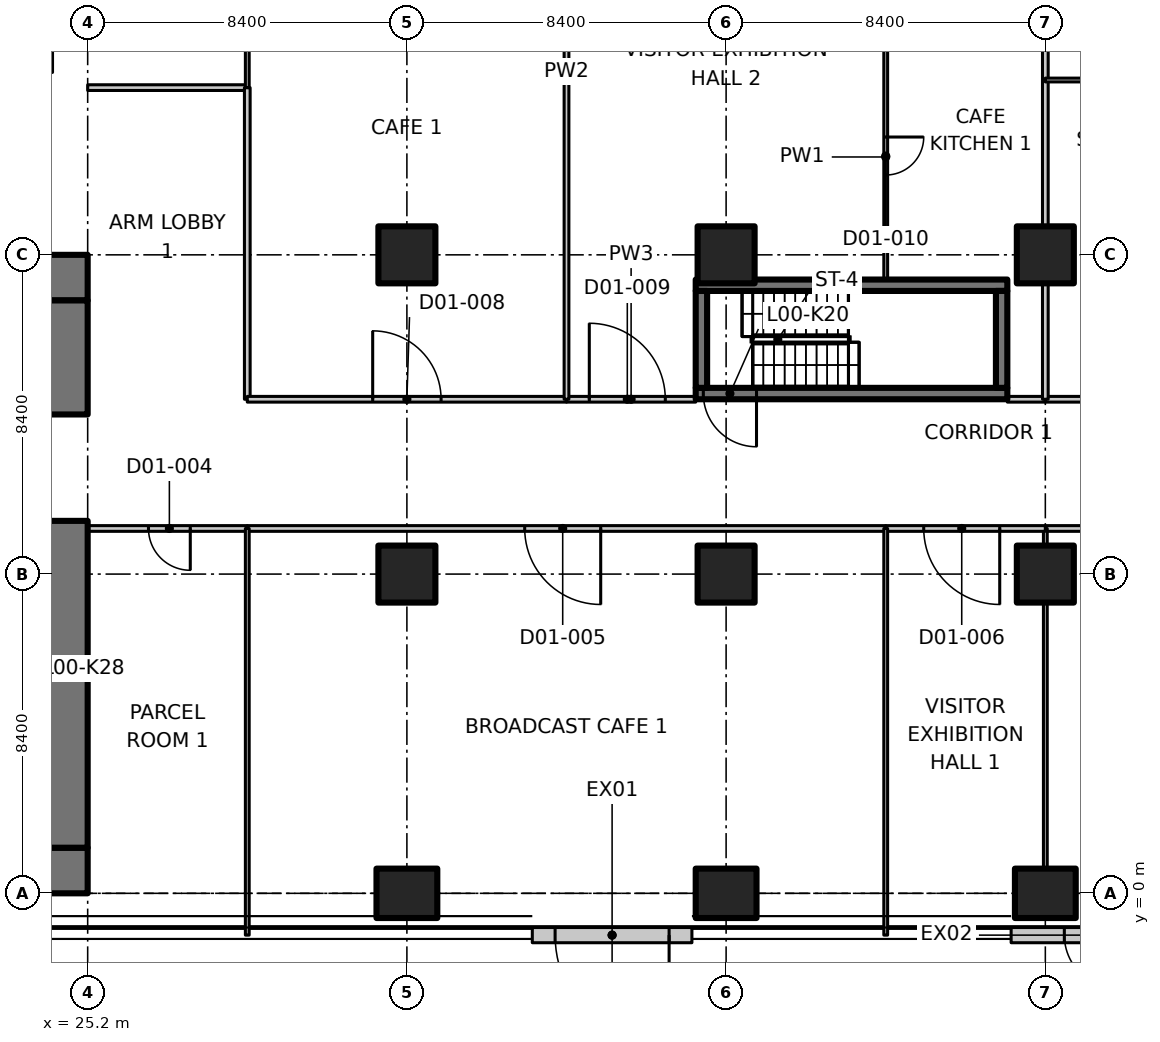
"""IFC4 building model, lengths in metres.
Left out: names, types, materials, properties, quantities, classifications, styles, units other than length and angle.
Written with IfcOpenShell. Run it as: python <this file> out.ifc"""

import sys

from ifc_helpers import new_model, si_unit, direction, frame, frame_2d, origin, origin_2d, place, context, subcontext, project, spatial, polyline, rectangle, outline, extrude, element, fill, save


model = new_model("IFC4")
c1 = context("Model", 3, precision=1e-05, world=origin(), true_north=direction((0.0, 1.0)))
c2 = subcontext(c1, "Body", "Model", "MODEL_VIEW")
j1 = project(units=[si_unit("LENGTHUNIT", "METRE"), si_unit("PLANEANGLEUNIT", "RADIAN")], contexts=[c1])
p1 = place(None, origin())
s1 = spatial("IfcSite", under=j1, at=p1, CompositionType="ELEMENT")
p2 = place(p1, origin())
s2 = spatial("IfcBuilding", under=s1, at=p2, CompositionType="ELEMENT")
p3 = place(p2, origin())
s3 = spatial("IfcBuildingStorey", under=s2, at=p3, CompositionType="ELEMENT", Elevation=0.0)
p4 = place(p3, frame((33.6, 0.0, 0.0), z_axis=(0.0, 0.0, 1.0), x_axis=(0.0, 1.0, 0.0)))
e1 = element("IfcColumn", 1, at=p4, inside=s3, PredefinedType="COLUMN", context=c2, shape_type="SweptSolid", body=[
    extrude(rectangle(XDim=1.3, YDim=1.6, at=origin_2d()), origin(), (0.0, 0.0, 1.0), 6.75),
])
for number, where, z_axis, x_axis in (
    (2, (33.6, 8.4, 0.0), (0.0, 0.0, 1.0), (1.0, 0.0, 0.0)),
    (3, (33.6, 16.8, 0.0), (0.0, 0.0, 1.0), (1.0, 0.0, 0.0)),
):
    element("IfcColumn", number, at=place(p3, frame(where, z_axis=z_axis, x_axis=x_axis)), inside=s3, PredefinedType="COLUMN", context=c2, shape_type="SweptSolid", body=[
        extrude(rectangle(XDim=1.5, YDim=1.5, at=origin_2d()), origin(), (0.0, 0.0, 1.0), 6.75),
    ])
p5 = place(p3, frame((42.0, 0.0, 0.0), z_axis=(0.0, 0.0, 1.0), x_axis=(0.0, 1.0, 0.0)))
e4 = element("IfcColumn", 4, at=p5, inside=s3, PredefinedType="COLUMN", context=c2, shape_type="SweptSolid", body=[
    extrude(rectangle(XDim=1.3, YDim=1.6, at=origin_2d()), origin(), (0.0, 0.0, 1.0), 6.75),
])
for number, where, z_axis, x_axis in (
    (5, (42.0, 8.4, 0.0), (0.0, 0.0, 1.0), (1.0, 0.0, 0.0)),
    (6, (42.0, 16.8, 0.0), (0.0, 0.0, 1.0), (1.0, 0.0, 0.0)),
):
    element("IfcColumn", number, at=place(p3, frame(where, z_axis=z_axis, x_axis=x_axis)), inside=s3, PredefinedType="COLUMN", context=c2, shape_type="SweptSolid", body=[
        extrude(rectangle(XDim=1.5, YDim=1.5, at=origin_2d()), origin(), (0.0, 0.0, 1.0), 6.75),
    ])
p6 = place(p3, frame((50.4, 0.0, 0.0), z_axis=(0.0, 0.0, 1.0), x_axis=(0.0, 1.0, 0.0)))
e7 = element("IfcColumn", 7, at=p6, inside=s3, PredefinedType="COLUMN", context=c2, shape_type="SweptSolid", body=[
    extrude(rectangle(XDim=1.3, YDim=1.6, at=origin_2d()), origin(), (0.0, 0.0, 1.0), 6.75),
])
for number, where, z_axis, x_axis in (
    (8, (50.4, 8.4, 0.0), (0.0, 0.0, 1.0), (1.0, 0.0, 0.0)),
    (9, (50.4, 16.8, 0.0), (0.0, 0.0, 1.0), (1.0, 0.0, 0.0)),
):
    element("IfcColumn", number, at=place(p3, frame(where, z_axis=z_axis, x_axis=x_axis)), inside=s3, PredefinedType="COLUMN", context=c2, shape_type="SweptSolid", body=[
        extrude(rectangle(XDim=1.5, YDim=1.5, at=origin_2d()), origin(), (0.0, 0.0, 1.0), 6.75),
    ])
p7 = place(p3, frame((41.1, -1.1, 0.0), z_axis=(0.0, 0.0, 1.0), x_axis=(-1.0, 0.0, 0.0)))
e10 = element("IfcWall", 10, at=p7, inside=s3, PredefinedType="SOLIDWALL", context=c2, shape_type="SweptSolid", body=[
    extrude(rectangle(XDim=4.2, YDim=0.4, at=frame_2d((2.1, 0.0))), origin(), (0.0, 0.0, 1.0), 6.75),
])
p8 = place(p7, frame((0.6, 0.0, 0.0)))
e11 = element("IfcOpeningElement", 11, at=p8, cuts=e10, PredefinedType="OPENING", context=c2, shape_type="SweptSolid", body=[
    extrude(rectangle(XDim=3.0, YDim=2.8, at=frame_2d((1.5, 1.4))), frame((0.0, 0.21, 0.0), z_axis=(0.0, -1.0, 0.0), x_axis=(1.0, 0.0, 0.0)), (0.0, 0.0, 1.0), 0.42),
])
p9 = place(p3, frame((53.7, -1.1, 0.0), z_axis=(0.0, 0.0, 1.0), x_axis=(-1.0, 0.0, 0.0)))
e12 = element("IfcWall", 12, at=p9, inside=s3, PredefinedType="SOLIDWALL", context=c2, shape_type="SweptSolid", body=[
    extrude(rectangle(XDim=4.2, YDim=0.4, at=frame_2d((2.1, 0.0))), origin(), (0.0, 0.0, 1.0), 6.75),
])
p10 = place(p9, frame((1.4, 0.0, 0.0)))
e13 = element("IfcOpeningElement", 13, at=p10, cuts=e12, PredefinedType="OPENING", context=c2, shape_type="SweptSolid", body=[
    extrude(rectangle(XDim=1.4, YDim=2.4, at=frame_2d((0.7, 1.2))), frame((0.0, 0.21, 0.0), z_axis=(0.0, -1.0, 0.0), x_axis=(1.0, 0.0, 0.0)), (0.0, 0.0, 1.0), 0.42),
])
p11 = place(p3, frame((25.2, 0.6, 0.0), z_axis=(0.0, 0.0, 1.0), x_axis=(-1.0, 0.0, 0.0)))
e14 = element("IfcWall", 14, at=p11, inside=s3, PredefinedType="SHEAR", context=c2, shape_type="SweptSolid", body=[
    extrude(rectangle(XDim=18.464, YDim=1.2, at=frame_2d((9.232, 0.0))), origin(), (0.0, 0.0, 1.0), 6.75),
])
p12 = place(p11, frame((7.8, 0.0, 0.0)))
e15 = element("IfcOpeningElement", 15, at=p12, cuts=e14, PredefinedType="OPENING", context=c2, shape_type="SweptSolid", body=[
    extrude(rectangle(XDim=1.4, YDim=2.1, at=frame_2d((0.7, 1.05))), frame((0.0, 0.61, 0.0), z_axis=(0.0, -1.0, 0.0), x_axis=(1.0, 0.0, 0.0)), (0.0, 0.0, 1.0), 1.22),
])
p13 = place(p3, frame((23.8, 16.2, 0.0), z_axis=(0.0, 0.0, 1.0), x_axis=(1.0, 0.0, 0.0)))
e16 = element("IfcWall", 16, at=p13, inside=s3, PredefinedType="SHEAR", context=c2, shape_type="SweptSolid", body=[
    extrude(rectangle(XDim=1.4, YDim=1.2, at=frame_2d((0.7, 0.0))), origin(), (0.0, 0.0, 1.0), 6.75),
])
p14 = place(p3, frame((24.6, 1.2, 0.0), z_axis=(0.0, 0.0, 1.0), x_axis=(0.0, 1.0, 0.0)))
e17 = element("IfcWall", 17, at=p14, inside=s3, PredefinedType="SHEAR", context=c2, shape_type="SweptSolid", body=[
    extrude(rectangle(XDim=8.6, YDim=1.2, at=frame_2d((4.3, 0.0))), origin(), (0.0, 0.0, 1.0), 6.75),
])
p15 = place(p3, frame((24.6, 12.6, 0.0), z_axis=(0.0, 0.0, 1.0), x_axis=(0.0, 1.0, 0.0)))
e18 = element("IfcWall", 18, at=p15, inside=s3, PredefinedType="SHEAR", context=c2, shape_type="SweptSolid", body=[
    extrude(rectangle(XDim=3.0, YDim=1.2, at=frame_2d((1.5, 0.0))), origin(), (0.0, 0.0, 1.0), 6.75),
])
p16 = place(p3, frame((49.4, 13.15, 0.0), z_axis=(0.0, 0.0, 1.0), x_axis=(-1.0, 0.0, 0.0)))
e19 = element("IfcWall", 19, at=p16, inside=s3, PredefinedType="SHEAR", context=c2, shape_type="SweptSolid", body=[
    extrude(rectangle(XDim=8.2, YDim=0.3, at=frame_2d((4.1, 0.0))), origin(), (0.0, 0.0, 1.0), 6.75),
])
p17 = place(p16, frame((6.6, 0.0, 0.0)))
e20 = element("IfcOpeningElement", 20, at=p17, cuts=e19, PredefinedType="OPENING", context=c2, shape_type="SweptSolid", body=[
    extrude(rectangle(XDim=1.4, YDim=2.1, at=frame_2d((0.7, 1.05))), frame((0.0, 0.16, 0.0), z_axis=(0.0, -1.0, 0.0), x_axis=(1.0, 0.0, 0.0)), (0.0, 0.0, 1.0), 0.32),
])
p18 = place(p3, frame((41.2, 16.0, 0.0), z_axis=(0.0, 0.0, 1.0), x_axis=(1.0, 0.0, 0.0)))
e21 = element("IfcWall", 21, at=p18, inside=s3, PredefinedType="SHEAR", context=c2, shape_type="SweptSolid", body=[
    extrude(rectangle(XDim=8.2, YDim=0.3, at=frame_2d((4.1, 0.0))), origin(), (0.0, 0.0, 1.0), 6.75),
])
for number, where, z_axis, x_axis in (
    (22, (41.35, 13.3, 0.0), (0.0, 0.0, 1.0), (0.0, 1.0, 0.0)),
    (23, (49.25, 13.3, 0.0), (0.0, 0.0, 1.0), (0.0, 1.0, 0.0)),
):
    element("IfcWall", number, at=place(p3, frame(where, z_axis=z_axis, x_axis=x_axis)), inside=s3, PredefinedType="SHEAR", context=c2, shape_type="SweptSolid", body=[
        extrude(rectangle(XDim=2.55, YDim=0.3, at=frame_2d((1.275, 0.0))), origin(), (0.0, 0.0, 1.0), 6.75),
    ])
p19 = place(p3, frame((25.2, 21.2, 0.0), z_axis=(0.0, 0.0, 1.0), x_axis=(1.0, 0.0, 0.0)))
e24 = element("IfcWall", 24, at=p19, inside=s3, PredefinedType="PARTITIONING", context=c2, shape_type="SweptSolid", body=[
    extrude(rectangle(XDim=4.2, YDim=0.15, at=frame_2d((2.1, 0.0))), origin(), (0.0, 0.0, 1.0), 6.73),
])
p20 = place(p3, frame((29.4, 9.6, 0.0), z_axis=(0.0, 0.0, 1.0), x_axis=(-1.0, 0.0, 0.0)))
e25 = element("IfcWall", 25, at=p20, inside=s3, PredefinedType="PARTITIONING", context=c2, shape_type="SweptSolid", body=[
    extrude(rectangle(XDim=4.2, YDim=0.15, at=frame_2d((2.1, 0.0))), origin(), (0.0, 0.0, 1.0), 6.73),
])
p21 = place(p20, frame((1.5, 0.0, 0.0)))
e26 = element("IfcOpeningElement", 26, at=p21, cuts=e25, PredefinedType="OPENING", context=c2, shape_type="SweptSolid", body=[
    extrude(rectangle(XDim=1.1, YDim=2.1, at=frame_2d((0.55, 1.05))), frame((0.0, 0.085, 0.0), z_axis=(0.0, -1.0, 0.0), x_axis=(1.0, 0.0, 0.0)), (0.0, 0.0, 1.0), 0.17),
])
p22 = place(p3, frame((29.4, 21.2, 0.0), z_axis=(0.0, 0.0, 1.0), x_axis=(0.0, -1.0, 0.0)))
e27 = element("IfcWall", 27, at=p22, inside=s3, PredefinedType="PARTITIONING", context=c2, shape_type="SweptSolid", body=[
    extrude(rectangle(XDim=8.2, YDim=0.15, at=frame_2d((4.1, 0.0))), origin(), (0.0, 0.0, 1.0), 6.73),
])
p23 = place(p3, frame((29.4, 27.275, 0.0), z_axis=(0.0, 0.0, 1.0), x_axis=(0.0, -1.0, 0.0)))
e28 = element("IfcWall", 28, at=p23, inside=s3, PredefinedType="PARTITIONING", context=c2, shape_type="SweptSolid", body=[
    extrude(outline(polyline([(0.0, 0.0), (6.075, 0.0), (6.075, 6.73), (2.525, 6.73), (2.523, 6.38), (1.627, 6.38), (1.625, 6.73), (0.0, 6.73), (0.0, 0.0)])), frame((0.0, 0.05, 0.0), z_axis=(0.0, -1.0, 0.0), x_axis=(1.0, 0.0, 0.0)), (0.0, 0.0, 1.0), 0.1),
])
p24 = place(p3, frame((63.0, 9.6, 0.0), z_axis=(0.0, 0.0, 1.0), x_axis=(-1.0, 0.0, 0.0)))
e29 = element("IfcWall", 29, at=p24, inside=s3, PredefinedType="PARTITIONING", context=c2, shape_type="SweptSolid", body=[
    extrude(rectangle(XDim=12.6, YDim=0.15, at=frame_2d((6.3, 0.0))), origin(), (0.0, 0.0, 1.0), 6.73),
])
p25 = place(p24, frame((5.2, 0.0, 0.0)))
e30 = element("IfcOpeningElement", 30, at=p25, cuts=e29, PredefinedType="OPENING", context=c2, shape_type="SweptSolid", body=[
    extrude(rectangle(XDim=2.0, YDim=2.4, at=frame_2d((1.0, 1.2))), frame((0.0, 0.085, 0.0), z_axis=(0.0, -1.0, 0.0), x_axis=(1.0, 0.0, 0.0)), (0.0, 0.0, 1.0), 0.17),
])
p26 = place(p3, frame((50.4, 0.67, 0.0), z_axis=(0.0, 0.0, 1.0), x_axis=(0.0, 1.0, 0.0)))
e31 = element("IfcWall", 31, at=p26, inside=s3, PredefinedType="PARTITIONING", context=c2, shape_type="SweptSolid", body=[
    extrude(rectangle(XDim=6.96, YDim=0.1, at=frame_2d((3.48, 0.0))), origin(), (0.0, 0.0, 1.0), 6.73),
])
p27 = place(p3, frame((50.4, 9.17, 0.0), z_axis=(0.0, 0.0, 1.0), x_axis=(0.0, 1.0, 0.0)))
e32 = element("IfcWall", 32, at=p27, inside=s3, PredefinedType="PARTITIONING", context=c2, shape_type="SweptSolid", body=[
    extrude(rectangle(XDim=0.43, YDim=0.1, at=frame_2d((0.215, 0.0))), origin(), (0.0, 0.0, 1.0), 6.73),
])
p28 = place(p3, frame((46.2, 9.6, 0.0), z_axis=(0.0, 0.0, 1.0), x_axis=(-1.0, 0.0, 0.0)))
e33 = element("IfcWall", 33, at=p28, inside=s3, PredefinedType="PARTITIONING", context=c2, shape_type="SweptSolid", body=[
    extrude(rectangle(XDim=16.8, YDim=0.15, at=frame_2d((8.4, 0.0))), origin(), (0.0, 0.0, 1.0), 6.73),
])
p29 = place(p28, frame((7.5, 0.0, 0.0)))
e34 = element("IfcOpeningElement", 34, at=p29, cuts=e33, PredefinedType="OPENING", context=c2, shape_type="SweptSolid", body=[
    extrude(rectangle(XDim=2.0, YDim=2.4, at=frame_2d((1.0, 1.2))), frame((0.0, 0.085, 0.0), z_axis=(0.0, -1.0, 0.0), x_axis=(1.0, 0.0, 0.0)), (0.0, 0.0, 1.0), 0.17),
])
p30 = place(p3, frame((50.4, 9.6, 0.0), z_axis=(0.0, 0.0, 1.0), x_axis=(-1.0, 0.0, 0.0)))
e35 = element("IfcWall", 35, at=p30, inside=s3, PredefinedType="PARTITIONING", context=c2, shape_type="SweptSolid", body=[
    extrude(rectangle(XDim=4.2, YDim=0.15, at=frame_2d((2.1, 0.0))), origin(), (0.0, 0.0, 1.0), 6.73),
])
p31 = place(p30, frame((1.2, 0.0, 0.0)))
e36 = element("IfcOpeningElement", 36, at=p31, cuts=e35, PredefinedType="OPENING", context=c2, shape_type="SweptSolid", body=[
    extrude(rectangle(XDim=2.0, YDim=2.4, at=frame_2d((1.0, 1.2))), frame((0.0, 0.085, 0.0), z_axis=(0.0, -1.0, 0.0), x_axis=(1.0, 0.0, 0.0)), (0.0, 0.0, 1.0), 0.17),
])
p32 = place(p3, frame((29.4, 13.0, 0.0), z_axis=(0.0, 0.0, 1.0), x_axis=(1.0, 0.0, 0.0)))
e37 = element("IfcWall", 37, at=p32, inside=s3, PredefinedType="PARTITIONING", context=c2, shape_type="SweptSolid", body=[
    extrude(rectangle(XDim=8.4, YDim=0.15, at=frame_2d((4.2, 0.0))), origin(), (0.0, 0.0, 1.0), 6.73),
])
p33 = place(p32, frame((3.3, 0.0, 0.0)))
e38 = element("IfcOpeningElement", 38, at=p33, cuts=e37, PredefinedType="OPENING", context=c2, shape_type="SweptSolid", body=[
    extrude(rectangle(XDim=1.8, YDim=2.1, at=frame_2d((0.9, 1.05))), frame((0.0, 0.085, 0.0), z_axis=(0.0, -1.0, 0.0), x_axis=(1.0, 0.0, 0.0)), (0.0, 0.0, 1.0), 0.17),
])
p34 = place(p3, frame((37.8, 13.0, 0.0), z_axis=(0.0, 0.0, 1.0), x_axis=(1.0, 0.0, 0.0)))
e39 = element("IfcWall", 39, at=p34, inside=s3, PredefinedType="PARTITIONING", context=c2, shape_type="SweptSolid", body=[
    extrude(rectangle(XDim=3.4, YDim=0.15, at=frame_2d((1.7, 0.0))), origin(), (0.0, 0.0, 1.0), 6.73),
])
p35 = place(p34, frame((0.6, 0.0, 0.0)))
e40 = element("IfcOpeningElement", 40, at=p35, cuts=e39, PredefinedType="OPENING", context=c2, shape_type="SweptSolid", body=[
    extrude(rectangle(XDim=2.0, YDim=2.4, at=frame_2d((1.0, 1.2))), frame((0.0, 0.085, 0.0), z_axis=(0.0, -1.0, 0.0), x_axis=(1.0, 0.0, 0.0)), (0.0, 0.0, 1.0), 0.17),
])
p36 = place(p3, frame((49.4, 13.0, 0.0), z_axis=(0.0, 0.0, 1.0), x_axis=(1.0, 0.0, 0.0)))
e41 = element("IfcWall", 41, at=p36, inside=s3, PredefinedType="PARTITIONING", context=c2, shape_type="SweptSolid", body=[
    extrude(rectangle(XDim=1.0, YDim=0.15, at=frame_2d((0.5, 0.0))), origin(), (0.0, 0.0, 1.0), 6.73),
])
p37 = place(p3, frame((50.4, 13.0, 0.0), z_axis=(0.0, 0.0, 1.0), x_axis=(1.0, 0.0, 0.0)))
e42 = element("IfcWall", 42, at=p37, inside=s3, PredefinedType="PARTITIONING", context=c2, shape_type="SweptSolid", body=[
    extrude(rectangle(XDim=4.2, YDim=0.15, at=frame_2d((2.1, 0.0))), origin(), (0.0, 0.0, 1.0), 6.73),
])
for number, where, z_axis, x_axis in (
    (43, (29.4, 9.6, 0.0), (0.0, 0.0, 1.0), (0.0, -1.0, 0.0)),
    (44, (46.2, 9.6, 0.0), (0.0, 0.0, 1.0), (0.0, -1.0, 0.0)),
):
    element("IfcWall", number, at=place(p3, frame(where, z_axis=z_axis, x_axis=x_axis)), inside=s3, PredefinedType="PARTITIONING", context=c2, shape_type="SweptSolid", body=[
        extrude(outline(polyline([(0.0, 0.0), (10.7, 0.0), (10.7, 6.73), (10.05, 6.73), (10.048, 6.38), (9.152, 6.38), (9.15, 6.73), (0.0, 6.73), (0.0, 0.0)])), frame((0.0, 0.05, 0.0), z_axis=(0.0, -1.0, 0.0), x_axis=(1.0, 0.0, 0.0)), (0.0, 0.0, 1.0), 0.1),
    ])
p38 = place(p3, frame((37.8, 30.243, 0.0), z_axis=(0.0, 0.0, 1.0), x_axis=(0.0, -1.0, 0.0)))
e45 = element("IfcWall", 45, at=p38, inside=s3, PredefinedType="PARTITIONING", context=c2, shape_type="SweptSolid", body=[
    extrude(outline(polyline([(0.0, 0.0), (17.243, 0.0), (17.243, 6.73), (5.493, 6.73), (5.491, 6.38), (4.595, 6.38), (4.593, 6.73), (0.0, 6.73), (0.0, 0.0)])), frame((0.0, 0.062, 0.0), z_axis=(0.0, -1.0, 0.0), x_axis=(1.0, 0.0, 0.0)), (0.0, 0.0, 1.0), 0.125),
])
p39 = place(p3, frame((46.2, 22.6, 0.0), z_axis=(0.0, 0.0, 1.0), x_axis=(0.0, -1.0, 0.0)))
e46 = element("IfcWall", 46, at=p39, inside=s3, PredefinedType="PARTITIONING", context=c2, shape_type="SweptSolid", body=[
    extrude(rectangle(XDim=6.45, YDim=0.1, at=frame_2d((3.225, 0.0))), origin(), (0.0, 0.0, 1.0), 6.73),
])
p40 = place(p39, frame((2.7, 0.0, 0.0)))
e47 = element("IfcOpeningElement", 47, at=p40, cuts=e46, PredefinedType="OPENING", context=c2, shape_type="SweptSolid", body=[
    extrude(rectangle(XDim=1.0, YDim=2.1, at=frame_2d((0.5, 1.05))), frame((0.0, 0.06, 0.0), z_axis=(0.0, -1.0, 0.0), x_axis=(1.0, 0.0, 0.0)), (0.0, 0.0, 1.0), 0.12),
])
p41 = place(p3, frame((50.4, 21.4, 0.0), z_axis=(0.0, 0.0, 1.0), x_axis=(0.0, -1.0, 0.0)))
e48 = element("IfcWall", 48, at=p41, inside=s3, PredefinedType="PARTITIONING", context=c2, shape_type="SweptSolid", body=[
    extrude(rectangle(XDim=3.83, YDim=0.15, at=frame_2d((1.915, 0.0))), origin(), (0.0, 0.0, 1.0), 6.73),
])
p42 = place(p3, frame((50.4, 16.03, 0.0), z_axis=(0.0, 0.0, 1.0), x_axis=(0.0, -1.0, 0.0)))
e49 = element("IfcWall", 49, at=p42, inside=s3, PredefinedType="PARTITIONING", context=c2, shape_type="SweptSolid", body=[
    extrude(rectangle(XDim=3.03, YDim=0.15, at=frame_2d((1.515, 0.0))), origin(), (0.0, 0.0, 1.0), 6.73),
])
p43 = place(p3, frame((50.4, 22.6, 0.0), z_axis=(0.0, 0.0, 1.0), x_axis=(0.0, -1.0, 0.0)))
e50 = element("IfcWall", 50, at=p43, inside=s3, PredefinedType="PARTITIONING", context=c2, shape_type="SweptSolid", body=[
    extrude(rectangle(XDim=1.2, YDim=0.15, at=frame_2d((0.6, 0.0))), origin(), (0.0, 0.0, 1.0), 6.73),
])
p44 = place(p3, frame((50.4, 21.4, 0.0), z_axis=(0.0, 0.0, 1.0), x_axis=(1.0, 0.0, 0.0)))
e51 = element("IfcWall", 51, at=p44, inside=s3, PredefinedType="PARTITIONING", context=c2, shape_type="SweptSolid", body=[
    extrude(rectangle(XDim=4.2, YDim=0.1, at=frame_2d((2.1, 0.0))), origin(), (0.0, 0.0, 1.0), 6.73),
])
p45 = place(p8, origin())
e52 = element("IfcDoor", 52, at=p45, inside=s3, OperationType="DOUBLE_DOOR_DOUBLE_SWING", PredefinedType="DOOR", context=c2, shape_type="SweptSolid", body=[
    extrude(rectangle(XDim=3.0, YDim=2.8, at=frame_2d((1.5, 1.4))), frame((0.0, 0.025, 0.0), z_axis=(0.0, -1.0, 0.0), x_axis=(1.0, 0.0, 0.0)), (0.0, 0.0, 1.0), 0.05),
])
fill(e11, e52)
p46 = place(p10, origin())
e53 = element("IfcDoor", 53, at=p46, inside=s3, OperationType="DOUBLE_DOOR_SINGLE_SWING", PredefinedType="DOOR", context=c2, shape_type="SweptSolid", body=[
    extrude(rectangle(XDim=1.4, YDim=2.4, at=frame_2d((0.7, 1.2))), frame((0.0, 0.025, 0.0), z_axis=(0.0, -1.0, 0.0), x_axis=(1.0, 0.0, 0.0)), (0.0, 0.0, 1.0), 0.05),
])
fill(e13, e53)
p47 = place(p17, origin())
e54 = element("IfcDoor", 54, at=p47, inside=s3, OperationType="SINGLE_SWING_LEFT", PredefinedType="DOOR", context=c2, shape_type="SweptSolid", body=[
    extrude(rectangle(XDim=1.4, YDim=2.1, at=frame_2d((0.7, 1.05))), frame((0.0, 0.025, 0.0), z_axis=(0.0, -1.0, 0.0), x_axis=(1.0, 0.0, 0.0)), (0.0, 0.0, 1.0), 0.05),
])
fill(e20, e54)
p48 = place(p21, origin())
e55 = element("IfcDoor", 55, at=p48, inside=s3, OperationType="SINGLE_SWING_LEFT", PredefinedType="DOOR", context=c2, shape_type="SweptSolid", body=[
    extrude(rectangle(XDim=1.1, YDim=2.1, at=frame_2d((0.55, 1.05))), frame((0.0, 0.025, 0.0), z_axis=(0.0, -1.0, 0.0), x_axis=(1.0, 0.0, 0.0)), (0.0, 0.0, 1.0), 0.05),
])
fill(e26, e55)
p49 = place(p29, origin())
e56 = element("IfcDoor", 56, at=p49, inside=s3, OperationType="DOUBLE_DOOR_SINGLE_SWING", PredefinedType="DOOR", context=c2, shape_type="SweptSolid", body=[
    extrude(rectangle(XDim=2.0, YDim=2.4, at=frame_2d((1.0, 1.2))), frame((0.0, 0.025, 0.0), z_axis=(0.0, -1.0, 0.0), x_axis=(1.0, 0.0, 0.0)), (0.0, 0.0, 1.0), 0.05),
])
fill(e34, e56)
p50 = place(p31, origin())
e57 = element("IfcDoor", 57, at=p50, inside=s3, OperationType="DOUBLE_DOOR_SINGLE_SWING", PredefinedType="DOOR", context=c2, shape_type="SweptSolid", body=[
    extrude(rectangle(XDim=2.0, YDim=2.4, at=frame_2d((1.0, 1.2))), frame((0.0, 0.025, 0.0), z_axis=(0.0, -1.0, 0.0), x_axis=(1.0, 0.0, 0.0)), (0.0, 0.0, 1.0), 0.05),
])
fill(e36, e57)
p51 = place(p33, origin())
e58 = element("IfcDoor", 58, at=p51, inside=s3, OperationType="DOUBLE_DOOR_SINGLE_SWING", PredefinedType="DOOR", context=c2, shape_type="SweptSolid", body=[
    extrude(rectangle(XDim=1.8, YDim=2.1, at=frame_2d((0.9, 1.05))), frame((0.0, 0.025, 0.0), z_axis=(0.0, -1.0, 0.0), x_axis=(1.0, 0.0, 0.0)), (0.0, 0.0, 1.0), 0.05),
])
fill(e38, e58)
p52 = place(p35, origin())
e59 = element("IfcDoor", 59, at=p52, inside=s3, OperationType="DOUBLE_DOOR_SINGLE_SWING", PredefinedType="DOOR", context=c2, shape_type="SweptSolid", body=[
    extrude(rectangle(XDim=2.0, YDim=2.4, at=frame_2d((1.0, 1.2))), frame((0.0, 0.025, 0.0), z_axis=(0.0, -1.0, 0.0), x_axis=(1.0, 0.0, 0.0)), (0.0, 0.0, 1.0), 0.05),
])
fill(e40, e59)
p53 = place(p40, origin())
e60 = element("IfcDoor", 60, at=p53, inside=s3, OperationType="SINGLE_SWING_LEFT", PredefinedType="DOOR", context=c2, shape_type="SweptSolid", body=[
    extrude(rectangle(XDim=1.0, YDim=2.1, at=frame_2d((0.5, 1.05))), frame((0.0, 0.025, 0.0), z_axis=(0.0, -1.0, 0.0), x_axis=(1.0, 0.0, 0.0)), (0.0, 0.0, 1.0), 0.05),
])
fill(e47, e60)
save(model, sys.argv[1])
